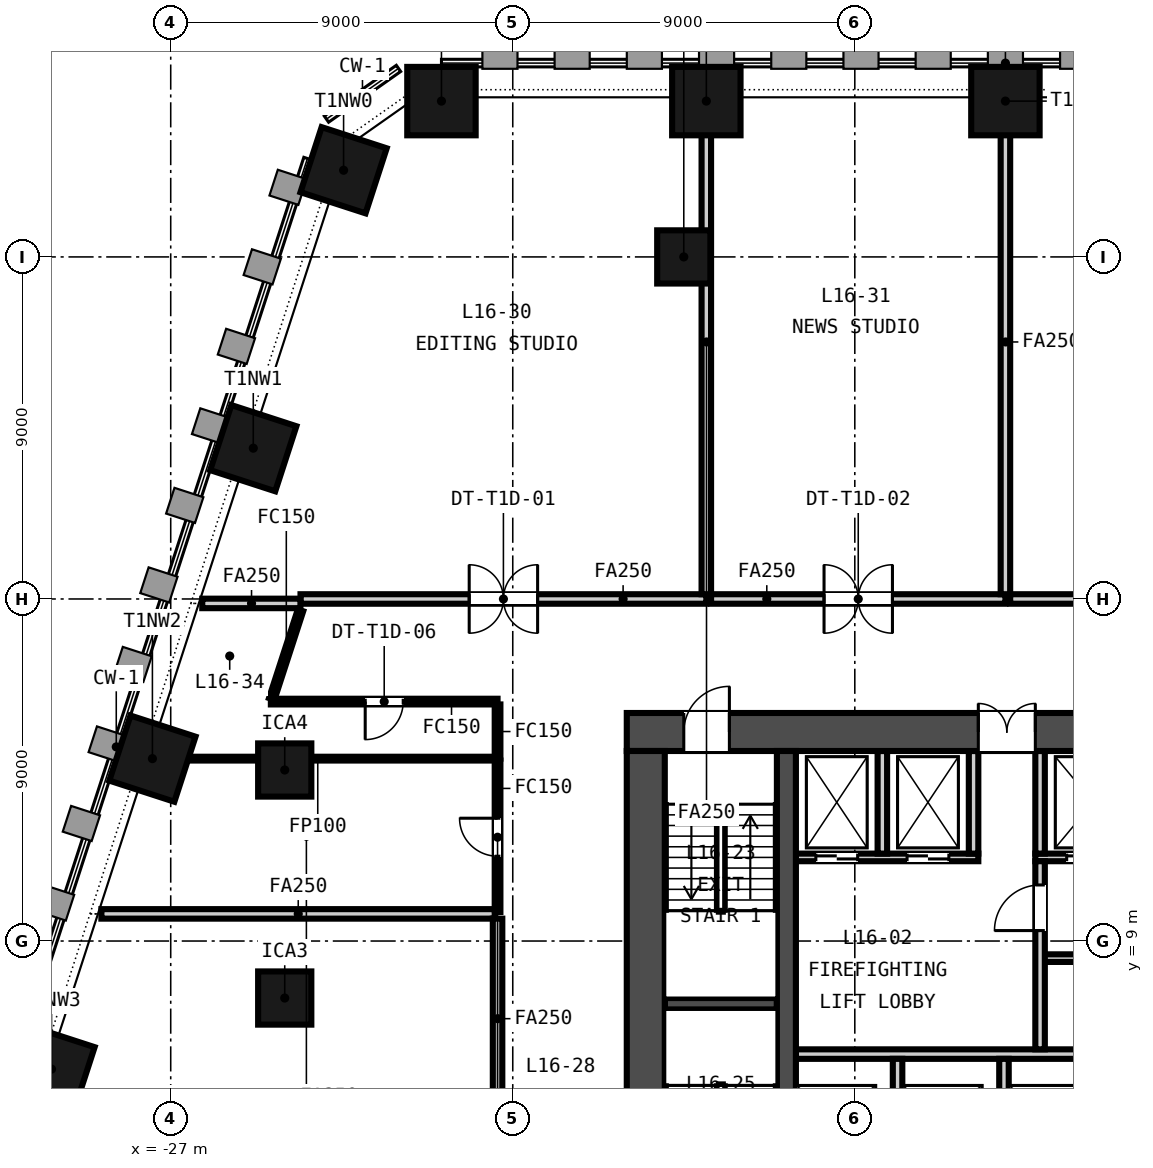
"""IFC4 building model, lengths in metres.
Left out: names, types, materials, properties, quantities, classifications, styles, units other than length and angle.
Written with IfcOpenShell. Run it as: python <this file> out.ifc"""

import sys

from ifc_helpers import new_model, si_unit, direction, frame, frame_2d, origin, origin_2d, place, context, subcontext, project, spatial, rectangle, extrude, element, fill, save


model = new_model("IFC4")
c1 = context("Model", 3, precision=1e-05, world=origin(), true_north=direction((0.0, 1.0)))
c2 = subcontext(c1, "Body", "Model", "MODEL_VIEW")
j1 = project(units=[si_unit("LENGTHUNIT", "METRE"), si_unit("PLANEANGLEUNIT", "RADIAN")], contexts=[c1])
p1 = place(None, origin())
s1 = spatial("IfcSite", under=j1, at=p1, CompositionType="ELEMENT")
p2 = place(p1, origin())
s2 = spatial("IfcBuilding", under=s1, at=p2, CompositionType="ELEMENT")
p3 = place(p2, frame((0.0, 0.0, 72.5)))
s3 = spatial("IfcBuildingStorey", under=s2, at=p3, CompositionType="ELEMENT", Elevation=72.5)
p4 = place(p3, frame((-15.0, 14.5, -0.15), z_axis=(0.0, 0.0, 1.0), x_axis=(1.0, 0.0, 0.0)))
e1 = element("IfcWall", 1, at=p4, inside=s3, PredefinedType="SOLIDWALL", context=c2, shape_type="SweptSolid", body=[
    extrude(rectangle(XDim=30.0, YDim=1.0, at=frame_2d((15.0, 0.0))), origin(), (0.0, 0.0, 1.0), 3.5),
])
p5 = place(p4, frame((9.25, 0.0, 0.15)))
e2 = element("IfcOpeningElement", 2, at=p5, cuts=e1, PredefinedType="OPENING", context=c2, shape_type="SweptSolid", body=[
    extrude(rectangle(XDim=1.5, YDim=2.1, at=frame_2d((0.75, 1.05))), frame((0.0, 0.51, 0.0), z_axis=(0.0, -1.0, 0.0), x_axis=(1.0, 0.0, 0.0)), (0.0, 0.0, 1.0), 1.02),
])
p6 = place(p4, frame((19.4, 0.0, 0.15)))
e3 = element("IfcOpeningElement", 3, at=p6, cuts=e1, PredefinedType="OPENING", context=c2, shape_type="SweptSolid", body=[
    extrude(rectangle(XDim=1.5, YDim=2.1, at=frame_2d((0.75, 1.05))), frame((0.0, 0.51, 0.0), z_axis=(0.0, -1.0, 0.0), x_axis=(1.0, 0.0, 0.0)), (0.0, 0.0, 1.0), 1.02),
])
p7 = place(p4, frame((1.5, 0.0, 0.15)))
e4 = element("IfcOpeningElement", 4, at=p7, cuts=e1, PredefinedType="OPENING", context=c2, shape_type="SweptSolid", body=[
    extrude(rectangle(XDim=1.2, YDim=2.1, at=frame_2d((0.6, 1.05))), frame((0.0, 0.51, 0.0), z_axis=(0.0, -1.0, 0.0), x_axis=(1.0, 0.0, 0.0)), (0.0, 0.0, 1.0), 1.02),
])
p8 = place(p4, frame((27.3, 0.0, 0.15)))
e5 = element("IfcOpeningElement", 5, at=p8, cuts=e1, PredefinedType="OPENING", context=c2, shape_type="SweptSolid", body=[
    extrude(rectangle(XDim=1.2, YDim=2.1, at=frame_2d((0.6, 1.05))), frame((0.0, 0.51, 0.0), z_axis=(0.0, -1.0, 0.0), x_axis=(1.0, 0.0, 0.0)), (0.0, 0.0, 1.0), 1.02),
])
p9 = place(p3, frame((-14.5, 1.0, -0.15), z_axis=(0.0, 0.0, 1.0), x_axis=(0.0, 1.0, 0.0)))
e6 = element("IfcWall", 6, at=p9, inside=s3, PredefinedType="SOLIDWALL", context=c2, shape_type="SweptSolid", body=[
    extrude(rectangle(XDim=13.0, YDim=1.0, at=frame_2d((6.5, 0.0))), origin(), (0.0, 0.0, 1.0), 3.5),
])
p10 = place(p3, frame((-10.8, 1.0, -0.15), z_axis=(0.0, 0.0, 1.0), x_axis=(0.0, 1.0, 0.0)))
e7 = element("IfcWall", 7, at=p10, inside=s3, PredefinedType="SOLIDWALL", context=c2, shape_type="SweptSolid", body=[
    extrude(rectangle(XDim=13.0, YDim=0.5, at=frame_2d((6.5, 0.0))), origin(), (0.0, 0.0, 1.0), 3.5),
])
for number, where, z_axis, x_axis in (
    (8, (-5.037, 31.1, -0.15), (0.0, 0.0, 1.0), (-1.0, 0.0, 0.0)),
    (9, (-12.907, 31.1, -0.15), (0.0, 0.0, 1.0), (-1.0, 0.0, 0.0)),
    (10, (-19.876, 31.1, -0.15), (0.0, 0.0, 1.0), (-1.0, 0.0, 0.0)),
    (11, (-22.451, 29.281, -0.15), (0.0, 0.0, 1.0), (-0.309, -0.951, 0.0)),
    (12, (-24.827, 21.968, -0.15), (0.0, 0.0, 1.0), (-0.309, -0.951, 0.0)),
    (13, (-27.482, 13.799, -0.15), (0.0, 0.0, 1.0), (-0.309, -0.951, 0.0)),
    (14, (-30.136, 5.63, -0.15), (0.0, 0.0, 1.0), (-0.309, -0.951, 0.0)),
):
    element("IfcColumn", number, at=place(p3, frame(where, z_axis=z_axis, x_axis=x_axis)), inside=s3, PredefinedType="COLUMN", context=c2, shape_type="SweptSolid", body=[
        extrude(rectangle(XDim=1.8, YDim=1.8, at=origin_2d()), origin(), (0.0, 0.0, 1.0), 3.5),
    ])
for number, where, z_axis, x_axis in (
    (15, (-24.0, 7.5, -0.15), (0.0, 0.0, 1.0), (1.0, 0.0, 0.0)),
    (16, (-24.0, 13.5, -0.15), (0.0, 0.0, 1.0), (1.0, 0.0, 0.0)),
    (17, (-13.5, 27.0, -0.15), (0.0, 0.0, 1.0), (1.0, 0.0, 0.0)),
):
    element("IfcColumn", number, at=place(p3, frame(where, z_axis=z_axis, x_axis=x_axis)), inside=s3, PredefinedType="COLUMN", context=c2, shape_type="SweptSolid", body=[
        extrude(rectangle(XDim=1.4, YDim=1.4, at=origin_2d()), origin(), (0.0, 0.0, 1.0), 3.5),
    ])
p11 = place(p3, frame((-10.55, 6.025, 0.0), z_axis=(0.0, 0.0, 1.0), x_axis=(1.0, 0.0, 0.0)))
e18 = element("IfcWall", 18, at=p11, inside=s3, PredefinedType="PARTITIONING", context=c2, shape_type="SweptSolid", body=[
    extrude(rectangle(XDim=21.1, YDim=0.25, at=frame_2d((10.55, 0.0))), origin(), (0.0, 0.0, 1.0), 3.35),
])
p12 = place(p3, frame((-4.125, 8.55, 0.0), z_axis=(0.0, 0.0, 1.0), x_axis=(1.0, 0.0, 0.0)))
e19 = element("IfcWall", 19, at=p12, inside=s3, PredefinedType="PARTITIONING", context=c2, shape_type="SweptSolid", body=[
    extrude(rectangle(XDim=14.675, YDim=0.2, at=frame_2d((7.337, 0.0))), origin(), (0.0, 0.0, 1.0), 3.35),
])
p13 = place(p12, frame((1.413, 0.0, 0.0)))
e20 = element("IfcOpeningElement", 20, at=p13, cuts=e19, PredefinedType="OPENING", context=c2, shape_type="SweptSolid", body=[
    extrude(rectangle(XDim=1.0, YDim=2.1, at=frame_2d((0.5, 1.05))), frame((0.0, 0.11, 0.0), z_axis=(0.0, -1.0, 0.0), x_axis=(1.0, 0.0, 0.0)), (0.0, 0.0, 1.0), 0.22),
])
p14 = place(p12, frame((5.0, 0.0, 0.0)))
e21 = element("IfcOpeningElement", 21, at=p14, cuts=e19, PredefinedType="OPENING", context=c2, shape_type="SweptSolid", body=[
    extrude(rectangle(XDim=1.0, YDim=2.1, at=frame_2d((0.5, 1.05))), frame((0.0, 0.11, 0.0), z_axis=(0.0, -1.0, 0.0), x_axis=(1.0, 0.0, 0.0)), (0.0, 0.0, 1.0), 0.22),
])
p15 = place(p12, frame((9.613, 0.0, 0.0)))
e22 = element("IfcOpeningElement", 22, at=p15, cuts=e19, PredefinedType="OPENING", context=c2, shape_type="SweptSolid", body=[
    extrude(rectangle(XDim=1.0, YDim=2.1, at=frame_2d((0.5, 1.05))), frame((0.0, 0.11, 0.0), z_axis=(0.0, -1.0, 0.0), x_axis=(1.0, 0.0, 0.0)), (0.0, 0.0, 1.0), 0.22),
])
p16 = place(p12, frame((13.475, 0.0, 0.0)))
e23 = element("IfcOpeningElement", 23, at=p16, cuts=e19, PredefinedType="OPENING", context=c2, shape_type="SweptSolid", body=[
    extrude(rectangle(XDim=0.9, YDim=2.1, at=frame_2d((0.45, 1.05))), frame((0.0, 0.11, 0.0), z_axis=(0.0, -1.0, 0.0), x_axis=(1.0, 0.0, 0.0)), (0.0, 0.0, 1.0), 0.22),
])
p17 = place(p3, frame((-10.55, 11.2, 0.0), z_axis=(0.0, 0.0, 1.0), x_axis=(1.0, 0.0, 0.0)))
e24 = element("IfcWall", 24, at=p17, inside=s3, PredefinedType="PARTITIONING", context=c2, shape_type="SweptSolid", body=[
    extrude(rectangle(XDim=4.8, YDim=0.2, at=frame_2d((2.4, 0.0))), origin(), (0.0, 0.0, 1.0), 3.35),
])
p18 = place(p17, frame((0.525, 0.0, 0.0)))
e25 = element("IfcOpeningElement", 25, at=p18, cuts=e24, PredefinedType="OPENING", context=c2, shape_type="SweptSolid", body=[
    extrude(rectangle(XDim=1.1, YDim=2.1, at=frame_2d((0.55, 1.05))), frame((0.0, 0.11, 0.0), z_axis=(0.0, -1.0, 0.0), x_axis=(1.0, 0.0, 0.0)), (0.0, 0.0, 1.0), 0.22),
])
p19 = place(p17, frame((2.925, 0.0, 0.0)))
e26 = element("IfcOpeningElement", 26, at=p19, cuts=e24, PredefinedType="OPENING", context=c2, shape_type="SweptSolid", body=[
    extrude(rectangle(XDim=1.1, YDim=2.1, at=frame_2d((0.55, 1.05))), frame((0.0, 0.11, 0.0), z_axis=(0.0, -1.0, 0.0), x_axis=(1.0, 0.0, 0.0)), (0.0, 0.0, 1.0), 0.22),
])
p20 = place(p3, frame((-4.25, 11.2, 0.0), z_axis=(0.0, 0.0, 1.0), x_axis=(1.0, 0.0, 0.0)))
e27 = element("IfcWall", 27, at=p20, inside=s3, PredefinedType="PARTITIONING", context=c2, shape_type="SweptSolid", body=[
    extrude(rectangle(XDim=8.65, YDim=0.2, at=frame_2d((4.325, 0.0))), origin(), (0.0, 0.0, 1.0), 3.35),
])
p21 = place(p20, frame((0.825, 0.0, 0.0)))
e28 = element("IfcOpeningElement", 28, at=p21, cuts=e27, PredefinedType="OPENING", context=c2, shape_type="SweptSolid", body=[
    extrude(rectangle(XDim=1.4, YDim=2.1, at=frame_2d((0.7, 1.05))), frame((0.0, 0.11, 0.0), z_axis=(0.0, -1.0, 0.0), x_axis=(1.0, 0.0, 0.0)), (0.0, 0.0, 1.0), 0.22),
])
p22 = place(p20, frame((3.625, 0.0, 0.0)))
e29 = element("IfcOpeningElement", 29, at=p22, cuts=e27, PredefinedType="OPENING", context=c2, shape_type="SweptSolid", body=[
    extrude(rectangle(XDim=1.4, YDim=2.1, at=frame_2d((0.7, 1.05))), frame((0.0, 0.11, 0.0), z_axis=(0.0, -1.0, 0.0), x_axis=(1.0, 0.0, 0.0)), (0.0, 0.0, 1.0), 0.22),
])
p23 = place(p3, frame((-4.125, 6.15, 0.0), z_axis=(0.0, 0.0, 1.0), x_axis=(0.0, 1.0, 0.0)))
e30 = element("IfcWall", 30, at=p23, inside=s3, PredefinedType="PARTITIONING", context=c2, shape_type="SweptSolid", body=[
    extrude(rectangle(XDim=4.95, YDim=0.25, at=frame_2d((2.475, 0.0))), origin(), (0.0, 0.0, 1.0), 3.35),
])
p24 = place(p23, frame((3.125, 0.0, 0.0)))
e31 = element("IfcOpeningElement", 31, at=p24, cuts=e30, PredefinedType="OPENING", context=c2, shape_type="SweptSolid", body=[
    extrude(rectangle(XDim=1.2, YDim=2.1, at=frame_2d((0.6, 1.05))), frame((0.0, 0.135, 0.0), z_axis=(0.0, -1.0, 0.0), x_axis=(1.0, 0.0, 0.0)), (0.0, 0.0, 1.0), 0.27),
])
for number, where, z_axis, x_axis in (
    (32, (-7.875, 3.6, 0.0), (0.0, 0.0, 1.0), (0.0, 1.0, 0.0)),
    (33, (-5.075, 3.6, 0.0), (0.0, 0.0, 1.0), (0.0, 1.0, 0.0)),
):
    element("IfcWall", number, at=place(p3, frame(where, z_axis=z_axis, x_axis=x_axis)), inside=s3, PredefinedType="PARTITIONING", context=c2, shape_type="SweptSolid", body=[
        extrude(rectangle(XDim=2.3, YDim=0.25, at=frame_2d((1.15, 0.0))), origin(), (0.0, 0.0, 1.0), 3.35),
    ])
for number, where, z_axis, x_axis in (
    (34, (-8.275, 11.3, 0.0), (0.0, 0.0, 1.0), (0.0, 1.0, 0.0)),
    (35, (-5.875, 11.3, 0.0), (0.0, 0.0, 1.0), (0.0, 1.0, 0.0)),
    (36, (-4.125, 11.3, 0.0), (0.0, 0.0, 1.0), (0.0, 1.0, 0.0)),
):
    element("IfcWall", number, at=place(p3, frame(where, z_axis=z_axis, x_axis=x_axis)), inside=s3, PredefinedType="PARTITIONING", context=c2, shape_type="SweptSolid", body=[
        extrude(rectangle(XDim=2.7, YDim=0.25, at=frame_2d((1.35, 0.0))), origin(), (0.0, 0.0, 1.0), 3.35),
    ])
p25 = place(p3, frame((-14.0, 7.35, -0.15), z_axis=(0.0, 0.0, 1.0), x_axis=(1.0, 0.0, 0.0)))
e37 = element("IfcWall", 37, at=p25, inside=s3, PredefinedType="SOLIDWALL", context=c2, shape_type="SweptSolid", body=[
    extrude(rectangle(XDim=2.95, YDim=0.3, at=frame_2d((1.475, 0.0))), origin(), (0.0, 0.0, 1.0), 3.5),
])
p26 = place(p3, frame((-18.4, 15.3, 0.0), z_axis=(0.0, 0.0, 1.0), x_axis=(-1.0, 0.0, 0.0)))
e38 = element("IfcWall", 38, at=p26, inside=s3, PredefinedType="PARTITIONING", context=c2, shape_type="SweptSolid", body=[
    extrude(rectangle(XDim=5.965, YDim=0.15, at=frame_2d((2.982, 0.0))), origin(), (0.0, 0.0, 1.0), 2.591),
])
p27 = place(p26, frame((2.482, 0.0, 0.0)))
e39 = element("IfcOpeningElement", 39, at=p27, cuts=e38, PredefinedType="OPENING", context=c2, shape_type="SweptSolid", body=[
    extrude(rectangle(XDim=1.0, YDim=2.1, at=frame_2d((0.5, 1.05))), frame((0.0, 0.085, 0.0), z_axis=(0.0, -1.0, 0.0), x_axis=(1.0, 0.0, 0.0)), (0.0, 0.0, 1.0), 0.17),
])
p28 = place(p3, frame((-23.585, 18.0, 0.0), z_axis=(0.0, 0.0, 1.0), x_axis=(1.0, 0.0, 0.0)))
e40 = element("IfcWall", 40, at=p28, inside=s3, PredefinedType="PARTITIONING", context=c2, shape_type="SweptSolid", body=[
    extrude(rectangle(XDim=10.678, YDim=0.25, at=frame_2d((5.339, 0.0))), origin(), (0.0, 0.0, 1.0), 2.591),
])
p29 = place(p28, frame((4.439, 0.0, 0.0)))
e41 = element("IfcOpeningElement", 41, at=p29, cuts=e40, PredefinedType="OPENING", context=c2, shape_type="SweptSolid", body=[
    extrude(rectangle(XDim=1.8, YDim=2.1, at=frame_2d((0.9, 1.05))), frame((0.0, 0.135, 0.0), z_axis=(0.0, -1.0, 0.0), x_axis=(1.0, 0.0, 0.0)), (0.0, 0.0, 1.0), 0.27),
])
p30 = place(p3, frame((-12.907, 18.125, 0.0), z_axis=(0.0, 0.0, 1.0), x_axis=(0.0, 1.0, 0.0)))
e42 = element("IfcWall", 42, at=p30, inside=s3, PredefinedType="PARTITIONING", context=c2, shape_type="SweptSolid", body=[
    extrude(rectangle(XDim=13.275, YDim=0.25, at=frame_2d((6.637, 0.0))), origin(), (0.0, 0.0, 1.0), 2.591),
])
p31 = place(p3, frame((-26.17, 17.883, 0.0), z_axis=(0.0, 0.0, 1.0), x_axis=(1.0, 0.0, 0.0)))
e43 = element("IfcWall", 43, at=p31, inside=s3, PredefinedType="PARTITIONING", context=c2, shape_type="SweptSolid", body=[
    extrude(rectangle(XDim=2.583, YDim=0.25, at=frame_2d((1.292, 0.0))), origin(), (0.0, 0.0, 1.0), 2.591),
])
p32 = place(p3, frame((-12.782, 18.0, 0.0), z_axis=(0.0, 0.0, 1.0), x_axis=(1.0, 0.0, 0.0)))
e44 = element("IfcWall", 44, at=p32, inside=s3, PredefinedType="PARTITIONING", context=c2, shape_type="SweptSolid", body=[
    extrude(rectangle(XDim=7.745, YDim=0.25, at=frame_2d((3.873, 0.0))), origin(), (0.0, 0.0, 1.0), 2.591),
])
p33 = place(p32, frame((2.972, 0.0, 0.0)))
e45 = element("IfcOpeningElement", 45, at=p33, cuts=e44, PredefinedType="OPENING", context=c2, shape_type="SweptSolid", body=[
    extrude(rectangle(XDim=1.8, YDim=2.1, at=frame_2d((0.9, 1.05))), frame((0.0, 0.135, 0.0), z_axis=(0.0, -1.0, 0.0), x_axis=(1.0, 0.0, 0.0)), (0.0, 0.0, 1.0), 0.27),
])
p34 = place(p3, frame((-5.037, 18.125, 0.0), z_axis=(0.0, 0.0, 1.0), x_axis=(0.0, 1.0, 0.0)))
e46 = element("IfcWall", 46, at=p34, inside=s3, PredefinedType="PARTITIONING", context=c2, shape_type="SweptSolid", body=[
    extrude(rectangle(XDim=13.275, YDim=0.25, at=frame_2d((6.637, 0.0))), origin(), (0.0, 0.0, 1.0), 2.591),
])
p35 = place(p3, frame((-4.912, 18.0, 0.0), z_axis=(0.0, 0.0, 1.0), x_axis=(1.0, 0.0, 0.0)))
e47 = element("IfcWall", 47, at=p35, inside=s3, PredefinedType="PARTITIONING", context=c2, shape_type="SweptSolid", body=[
    extrude(rectangle(XDim=13.512, YDim=0.25, at=frame_2d((6.756, 0.0))), origin(), (0.0, 0.0, 1.0), 2.591),
])
p36 = place(p35, frame((5.856, 0.0, 0.0)))
e48 = element("IfcOpeningElement", 48, at=p36, cuts=e47, PredefinedType="OPENING", context=c2, shape_type="SweptSolid", body=[
    extrude(rectangle(XDim=1.8, YDim=2.1, at=frame_2d((0.9, 1.05))), frame((0.0, 0.135, 0.0), z_axis=(0.0, -1.0, 0.0), x_axis=(1.0, 0.0, 0.0)), (0.0, 0.0, 1.0), 0.27),
])
p37 = place(p3, frame((-24.342, 15.371, 0.0), z_axis=(0.0, 0.0, 1.0), x_axis=(0.309099599888, 0.951029672171, 0.0)))
e49 = element("IfcWall", 49, at=p37, inside=s3, PredefinedType="PARTITIONING", context=c2, shape_type="SweptSolid", body=[
    extrude(rectangle(XDim=2.448, YDim=0.15, at=frame_2d((1.224, 0.0))), origin(), (0.0, 0.0, 1.0), 2.591),
])
p38 = place(p3, frame((-18.4, 13.799, 0.0), z_axis=(0.0, 0.0, 1.0), x_axis=(0.0, 1.0, 0.0)))
e50 = element("IfcWall", 50, at=p38, inside=s3, PredefinedType="PARTITIONING", context=c2, shape_type="SweptSolid", body=[
    extrude(rectangle(XDim=1.426, YDim=0.15, at=frame_2d((0.713, 0.0))), origin(), (0.0, 0.0, 1.0), 2.591),
])
p39 = place(p3, frame((-27.797, 13.799, 0.0), z_axis=(0.0, 0.0, 1.0), x_axis=(1.0, 0.0, 0.0)))
e51 = element("IfcWall", 51, at=p39, inside=s3, PredefinedType="PARTITIONING", context=c2, shape_type="SweptSolid", body=[
    extrude(rectangle(XDim=9.322, YDim=0.1, at=frame_2d((4.661, 0.0))), origin(), (0.0, 0.0, 1.0), 2.591),
])
p40 = place(p3, frame((-18.4, 9.764, 0.0), z_axis=(0.0, 0.0, 1.0), x_axis=(0.0, 1.0, 0.0)))
e52 = element("IfcWall", 52, at=p40, inside=s3, PredefinedType="PARTITIONING", context=c2, shape_type="SweptSolid", body=[
    extrude(rectangle(XDim=3.985, YDim=0.15, at=frame_2d((1.993, 0.0))), origin(), (0.0, 0.0, 1.0), 2.591),
])
p41 = place(p40, frame((1.468, 0.0, 0.0)))
e53 = element("IfcOpeningElement", 53, at=p41, cuts=e52, PredefinedType="OPENING", context=c2, shape_type="SweptSolid", body=[
    extrude(rectangle(XDim=1.0, YDim=2.1, at=frame_2d((0.5, 1.05))), frame((0.0, 0.085, 0.0), z_axis=(0.0, -1.0, 0.0), x_axis=(1.0, 0.0, 0.0)), (0.0, 0.0, 1.0), 0.17),
])
p42 = place(p3, frame((-28.824, 9.714, 0.0), z_axis=(0.0, 0.0, 1.0), x_axis=(1.0, 0.0, 0.0)))
e54 = element("IfcWall", 54, at=p42, inside=s3, PredefinedType="PARTITIONING", context=c2, shape_type="SweptSolid", body=[
    extrude(rectangle(XDim=10.349, YDim=0.25, at=frame_2d((5.174, 0.0))), origin(), (0.0, 0.0, 1.0), 2.591),
])
p43 = place(p3, frame((-18.4, 4.325, 0.0), z_axis=(0.0, 0.0, 1.0), x_axis=(0.0, 1.0, 0.0)))
e55 = element("IfcWall", 55, at=p43, inside=s3, PredefinedType="PARTITIONING", context=c2, shape_type="SweptSolid", body=[
    extrude(rectangle(XDim=5.264, YDim=0.25, at=frame_2d((2.632, 0.0))), origin(), (0.0, 0.0, 1.0), 2.591),
])
p44 = place(p24, origin())
e56 = element("IfcDoor", 56, at=p44, inside=s3, OperationType="SINGLE_SWING_LEFT", PredefinedType="DOOR", context=c2, shape_type="SweptSolid", body=[
    extrude(rectangle(XDim=1.2, YDim=2.1, at=frame_2d((0.6, 1.05))), frame((0.0, 0.025, 0.0), z_axis=(0.0, -1.0, 0.0), x_axis=(1.0, 0.0, 0.0)), (0.0, 0.0, 1.0), 0.05),
])
fill(e31, e56)
p45 = place(p18, origin())
e57 = element("IfcDoor", 57, at=p45, inside=s3, OperationType="DOUBLE_DOOR_SLIDING", PredefinedType="DOOR", context=c2, shape_type="SweptSolid", body=[
    extrude(rectangle(XDim=1.1, YDim=2.1, at=frame_2d((0.55, 1.05))), frame((0.0, 0.025, 0.0), z_axis=(0.0, -1.0, 0.0), x_axis=(1.0, 0.0, 0.0)), (0.0, 0.0, 1.0), 0.05),
])
fill(e25, e57)
p46 = place(p19, origin())
e58 = element("IfcDoor", 58, at=p46, inside=s3, OperationType="DOUBLE_DOOR_SLIDING", PredefinedType="DOOR", context=c2, shape_type="SweptSolid", body=[
    extrude(rectangle(XDim=1.1, YDim=2.1, at=frame_2d((0.55, 1.05))), frame((0.0, 0.025, 0.0), z_axis=(0.0, -1.0, 0.0), x_axis=(1.0, 0.0, 0.0)), (0.0, 0.0, 1.0), 0.05),
])
fill(e26, e58)
p47 = place(p21, origin())
e59 = element("IfcDoor", 59, at=p47, inside=s3, OperationType="DOUBLE_DOOR_SLIDING", PredefinedType="DOOR", context=c2, shape_type="SweptSolid", body=[
    extrude(rectangle(XDim=1.4, YDim=2.1, at=frame_2d((0.7, 1.05))), frame((0.0, 0.025, 0.0), z_axis=(0.0, -1.0, 0.0), x_axis=(1.0, 0.0, 0.0)), (0.0, 0.0, 1.0), 0.05),
])
fill(e28, e59)
p48 = place(p5, origin())
e60 = element("IfcDoor", 60, at=p48, inside=s3, OperationType="DOUBLE_DOOR_SINGLE_SWING", PredefinedType="DOOR", context=c2, shape_type="SweptSolid", body=[
    extrude(rectangle(XDim=1.5, YDim=2.1, at=frame_2d((0.75, 1.05))), frame((0.0, 0.025, 0.0), z_axis=(0.0, -1.0, 0.0), x_axis=(1.0, 0.0, 0.0)), (0.0, 0.0, 1.0), 0.05),
])
fill(e2, e60)
p49 = place(p7, origin())
e61 = element("IfcDoor", 61, at=p49, inside=s3, OperationType="SINGLE_SWING_RIGHT", PredefinedType="DOOR", context=c2, shape_type="SweptSolid", body=[
    extrude(rectangle(XDim=1.2, YDim=2.1, at=frame_2d((0.6, 1.05))), frame((0.0, 0.025, 0.0), z_axis=(0.0, -1.0, 0.0), x_axis=(1.0, 0.0, 0.0)), (0.0, 0.0, 1.0), 0.05),
])
fill(e4, e61)
p50 = place(p29, origin())
e62 = element("IfcDoor", 62, at=p50, inside=s3, OperationType="DOUBLE_DOOR_DOUBLE_SWING", PredefinedType="DOOR", context=c2, shape_type="SweptSolid", body=[
    extrude(rectangle(XDim=1.8, YDim=2.1, at=frame_2d((0.9, 1.05))), frame((0.0, 0.025, 0.0), z_axis=(0.0, -1.0, 0.0), x_axis=(1.0, 0.0, 0.0)), (0.0, 0.0, 1.0), 0.05),
])
fill(e41, e62)
p51 = place(p33, origin())
e63 = element("IfcDoor", 63, at=p51, inside=s3, OperationType="DOUBLE_DOOR_DOUBLE_SWING", PredefinedType="DOOR", context=c2, shape_type="SweptSolid", body=[
    extrude(rectangle(XDim=1.8, YDim=2.1, at=frame_2d((0.9, 1.05))), frame((0.0, 0.025, 0.0), z_axis=(0.0, -1.0, 0.0), x_axis=(1.0, 0.0, 0.0)), (0.0, 0.0, 1.0), 0.05),
])
fill(e45, e63)
p52 = place(p27, origin())
e64 = element("IfcDoor", 64, at=p52, inside=s3, OperationType="SINGLE_SWING_RIGHT", PredefinedType="DOOR", context=c2, shape_type="SweptSolid", body=[
    extrude(rectangle(XDim=1.0, YDim=2.1, at=frame_2d((0.5, 1.05))), frame((0.0, 0.025, 0.0), z_axis=(0.0, -1.0, 0.0), x_axis=(1.0, 0.0, 0.0)), (0.0, 0.0, 1.0), 0.05),
])
fill(e39, e64)
p53 = place(p41, origin())
e65 = element("IfcDoor", 65, at=p53, inside=s3, OperationType="SINGLE_SWING_RIGHT", PredefinedType="DOOR", context=c2, shape_type="SweptSolid", body=[
    extrude(rectangle(XDim=1.0, YDim=2.1, at=frame_2d((0.5, 1.05))), frame((0.0, 0.025, 0.0), z_axis=(0.0, -1.0, 0.0), x_axis=(1.0, 0.0, 0.0)), (0.0, 0.0, 1.0), 0.05),
])
fill(e53, e65)
save(model, sys.argv[1])
